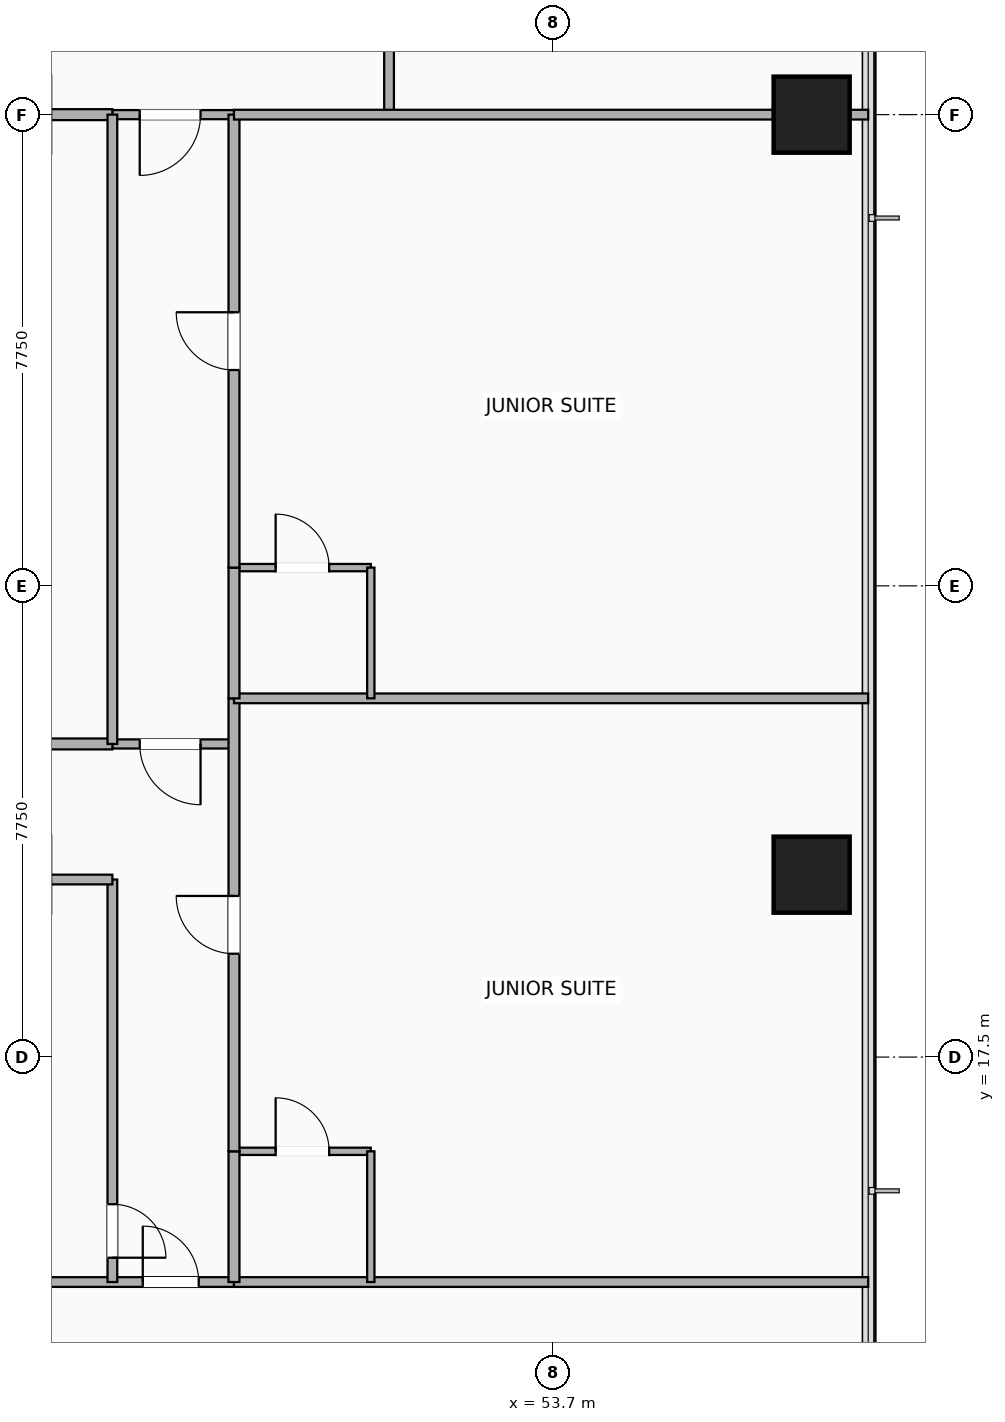
"""IFC4 building model, lengths in metres.
Left out: names, types, materials, properties, quantities, classifications, styles, units other than length and angle.
Written with IfcOpenShell. Run it as: python <this file> out.ifc"""

import sys

from ifc_helpers import new_model, si_unit, direction, frame, frame_2d, origin, origin_2d, place, context, subcontext, project, spatial, rectangle, extrude, element, fill, save


model = new_model("IFC4")
c1 = context("Model", 3, precision=1e-05, world=origin(), true_north=direction((0.0, 1.0)))
c2 = subcontext(c1, "Body", "Model", "MODEL_VIEW")
j1 = project(units=[si_unit("LENGTHUNIT", "METRE"), si_unit("PLANEANGLEUNIT", "RADIAN")], contexts=[c1])
p1 = place(None, origin())
s1 = spatial("IfcSite", under=j1, at=p1, CompositionType="ELEMENT")
p2 = place(p1, origin())
s2 = spatial("IfcBuilding", under=s1, at=p2, CompositionType="ELEMENT")
p3 = place(p2, frame((0.0, 0.0, 91.7)))
s3 = spatial("IfcBuildingStorey", under=s2, at=p3, CompositionType="ELEMENT", Elevation=91.7)
for number, where, z_axis, x_axis in (
    (1, (57.95, 20.5, -0.26), (0.0, 0.0, 1.0), (1.0, 0.0, 0.0)),
    (2, (57.95, 33.0, -0.26), (0.0, 0.0, 1.0), (1.0, 0.0, 0.0)),
):
    element("IfcColumn", number, at=place(p3, frame(where, z_axis=z_axis, x_axis=x_axis)), inside=s3, PredefinedType="COLUMN", context=c2, shape_type="SweptSolid", body=[
        extrude(rectangle(XDim=1.25, YDim=1.25, at=origin_2d()), origin(), (0.0, 0.0, 1.0), 3.5),
    ])
p4 = place(p3, frame((44.8, 13.8, 0.0), z_axis=(0.0, 0.0, 1.0), x_axis=(1.0, 0.0, 0.0)))
e3 = element("IfcWall", 3, at=p4, inside=s3, PredefinedType="PARTITIONING", context=c2, shape_type="SweptSolid", body=[
    extrude(rectangle(XDim=3.65, YDim=0.16, at=frame_2d((1.825, 0.0))), origin(), (0.0, 0.0, 1.0), 2.313),
])
p5 = place(p4, frame((3.07, 0.0, 0.0), z_axis=(0.0, 0.0, 1.0), x_axis=(-1.0, 0.0, 0.0)))
e4 = element("IfcOpeningElement", 4, at=p5, cuts=e3, PredefinedType="OPENING", context=c2, shape_type="SweptSolid", body=[
    extrude(rectangle(XDim=0.92, YDim=2.08, at=frame_2d((0.46, 1.04))), frame((0.0, 0.09, 0.0), z_axis=(0.0, -1.0, 0.0), x_axis=(1.0, 0.0, 0.0)), (0.0, 0.0, 1.0), 0.18),
])
p6 = place(p3, frame((46.45, 13.8, 0.0), z_axis=(0.0, 0.0, 1.0), x_axis=(0.0, 1.0, 0.0)))
e5 = element("IfcWall", 5, at=p6, inside=s3, PredefinedType="PARTITIONING", context=c2, shape_type="SweptSolid", body=[
    extrude(rectangle(XDim=6.62, YDim=0.16, at=frame_2d((3.31, 0.0))), origin(), (0.0, 0.0, 1.0), 2.313),
])
p7 = place(p6, frame((0.4, 0.0, 0.0)))
e6 = element("IfcOpeningElement", 6, at=p7, cuts=e5, PredefinedType="OPENING", context=c2, shape_type="SweptSolid", body=[
    extrude(rectangle(XDim=0.88, YDim=2.08, at=frame_2d((0.44, 1.04))), frame((0.0, 0.09, 0.0), z_axis=(0.0, -1.0, 0.0), x_axis=(1.0, 0.0, 0.0)), (0.0, 0.0, 1.0), 0.18),
])
p8 = place(p3, frame((44.8, 20.42, 0.0), z_axis=(0.0, 0.0, 1.0), x_axis=(1.0, 0.0, 0.0)))
e7 = element("IfcWall", 7, at=p8, inside=s3, PredefinedType="PARTITIONING", context=c2, shape_type="SweptSolid", body=[
    extrude(rectangle(XDim=1.65, YDim=0.16, at=frame_2d((0.825, 0.0))), origin(), (0.0, 0.0, 1.0), 2.313),
])
p9 = place(p3, frame((46.45, 22.65, 0.0), z_axis=(0.0, 0.0, 1.0), x_axis=(1.0, 0.0, 0.0)))
e8 = element("IfcWall", 8, at=p9, inside=s3, PredefinedType="PARTITIONING", context=c2, shape_type="SweptSolid", body=[
    extrude(rectangle(XDim=2.0, YDim=0.15, at=frame_2d((1.0, 0.0))), origin(), (0.0, 0.0, 1.0), 3.24),
])
p10 = place(p9, frame((0.45, 0.0, 0.0)))
e9 = element("IfcOpeningElement", 9, at=p10, cuts=e8, PredefinedType="OPENING", context=c2, shape_type="SweptSolid", body=[
    extrude(rectangle(XDim=1.0, YDim=2.15, at=frame_2d((0.5, 1.075))), frame((0.0, 0.085, 0.0), z_axis=(0.0, -1.0, 0.0), x_axis=(1.0, 0.0, 0.0)), (0.0, 0.0, 1.0), 0.17),
])
p11 = place(p3, frame((46.45, 33.0, 0.0), z_axis=(0.0, 0.0, 1.0), x_axis=(1.0, 0.0, 0.0)))
e10 = element("IfcWall", 10, at=p11, inside=s3, PredefinedType="PARTITIONING", context=c2, shape_type="SweptSolid", body=[
    extrude(rectangle(XDim=2.0, YDim=0.15, at=frame_2d((1.0, 0.0))), origin(), (0.0, 0.0, 1.0), 2.313),
])
p12 = place(p11, frame((0.45, 0.0, 0.0)))
e11 = element("IfcOpeningElement", 11, at=p12, cuts=e10, PredefinedType="OPENING", context=c2, shape_type="SweptSolid", body=[
    extrude(rectangle(XDim=1.0, YDim=2.15, at=frame_2d((0.5, 1.075))), frame((0.0, 0.085, 0.0), z_axis=(0.0, -1.0, 0.0), x_axis=(1.0, 0.0, 0.0)), (0.0, 0.0, 1.0), 0.17),
])
p13 = place(p3, frame((51.0, 33.0, 0.0), z_axis=(0.0, 0.0, 1.0), x_axis=(0.0, 1.0, 0.0)))
e12 = element("IfcWall", 12, at=p13, inside=s3, PredefinedType="PARTITIONING", context=c2, shape_type="SweptSolid", body=[
    extrude(rectangle(XDim=2.05, YDim=0.16, at=frame_2d((1.025, 0.0))), origin(), (0.0, 0.0, 1.0), 2.313),
])
p14 = place(p3, frame((40.9, 22.65, 0.0), z_axis=(0.0, 0.0, 1.0), x_axis=(1.0, 0.0, 0.0)))
e13 = element("IfcWall", 13, at=p14, inside=s3, PredefinedType="PARTITIONING", context=c2, shape_type="SweptSolid", body=[
    extrude(rectangle(XDim=5.55, YDim=0.18, at=frame_2d((2.775, 0.0))), origin(), (0.0, 0.0, 1.0), 2.313),
])
p15 = place(p14, frame((2.3, 0.0, 0.0)))
e14 = element("IfcOpeningElement", 14, at=p15, cuts=e13, PredefinedType="OPENING", context=c2, shape_type="SweptSolid", body=[
    extrude(rectangle(XDim=0.95, YDim=2.15, at=frame_2d((0.475, 1.075))), frame((0.0, 0.1, 0.0), z_axis=(0.0, -1.0, 0.0), x_axis=(1.0, 0.0, 0.0)), (0.0, 0.0, 1.0), 0.2),
])
p16 = place(p3, frame((40.9, 33.0, 0.0), z_axis=(0.0, 0.0, 1.0), x_axis=(1.0, 0.0, 0.0)))
e15 = element("IfcWall", 15, at=p16, inside=s3, PredefinedType="PARTITIONING", context=c2, shape_type="SweptSolid", body=[
    extrude(rectangle(XDim=5.55, YDim=0.18, at=frame_2d((2.775, 0.0))), origin(), (0.0, 0.0, 1.0), 2.313),
])
p17 = place(p3, frame((46.45, 22.65, 0.0), z_axis=(0.0, 0.0, 1.0), x_axis=(0.0, 1.0, 0.0)))
e16 = element("IfcWall", 16, at=p17, inside=s3, PredefinedType="PARTITIONING", context=c2, shape_type="SweptSolid", body=[
    extrude(rectangle(XDim=10.35, YDim=0.16, at=frame_2d((5.175, 0.0))), origin(), (0.0, 0.0, 1.0), 2.313),
])
p18 = place(p3, frame((48.45, 13.8, 0.0), z_axis=(0.0, 0.0, 1.0), x_axis=(1.0, 0.0, 0.0)))
e17 = element("IfcWall", 17, at=p18, inside=s3, PredefinedType="PARTITIONING", context=c2, shape_type="SweptSolid", body=[
    extrude(rectangle(XDim=10.43, YDim=0.16, at=frame_2d((5.215, 0.0))), origin(), (0.0, 0.0, 1.0), 2.603),
])
p19 = place(p3, frame((48.45, 15.95, 0.0), z_axis=(0.0, 0.0, 1.0), x_axis=(1.0, 0.0, 0.0)))
e18 = element("IfcWall", 18, at=p19, inside=s3, PredefinedType="PARTITIONING", context=c2, shape_type="SweptSolid", body=[
    extrude(rectangle(XDim=2.25, YDim=0.12, at=frame_2d((1.125, 0.0))), origin(), (0.0, 0.0, 1.0), 3.24),
])
p20 = place(p19, frame((1.565, 0.0, 0.0), z_axis=(0.0, 0.0, 1.0), x_axis=(-1.0, 0.0, 0.0)))
e19 = element("IfcOpeningElement", 19, at=p20, cuts=e18, PredefinedType="OPENING", context=c2, shape_type="SweptSolid", body=[
    extrude(rectangle(XDim=0.88, YDim=2.08, at=frame_2d((0.44, 1.04))), frame((0.0, 0.07, 0.0), z_axis=(0.0, -1.0, 0.0), x_axis=(1.0, 0.0, 0.0)), (0.0, 0.0, 1.0), 0.14),
])
p21 = place(p3, frame((50.7, 13.8, 0.0), z_axis=(0.0, 0.0, 1.0), x_axis=(0.0, 1.0, 0.0)))
e20 = element("IfcWall", 20, at=p21, inside=s3, PredefinedType="PARTITIONING", context=c2, shape_type="SweptSolid", body=[
    extrude(rectangle(XDim=2.15, YDim=0.12, at=frame_2d((1.075, 0.0))), origin(), (0.0, 0.0, 1.0), 2.922),
])
p22 = place(p3, frame((48.45, 13.8, 0.0), z_axis=(0.0, 0.0, 1.0), x_axis=(0.0, 1.0, 0.0)))
e21 = element("IfcWall", 21, at=p22, inside=s3, PredefinedType="PARTITIONING", context=c2, shape_type="SweptSolid", body=[
    extrude(rectangle(XDim=2.15, YDim=0.18, at=frame_2d((1.075, 0.0))), origin(), (0.0, 0.0, 1.0), 2.922),
])
p23 = place(p3, frame((48.45, 15.95, 0.0), z_axis=(0.0, 0.0, 1.0), x_axis=(0.0, 1.0, 0.0)))
e22 = element("IfcWall", 22, at=p23, inside=s3, PredefinedType="PARTITIONING", context=c2, shape_type="SweptSolid", body=[
    extrude(rectangle(XDim=7.45, YDim=0.18, at=frame_2d((3.725, 0.0))), origin(), (0.0, 0.0, 1.0), 2.313),
])
p24 = place(p23, frame((4.2, 0.0, 0.0), z_axis=(0.0, 0.0, 1.0), x_axis=(-1.0, 0.0, 0.0)))
e23 = element("IfcOpeningElement", 23, at=p24, cuts=e22, PredefinedType="OPENING", context=c2, shape_type="SweptSolid", body=[
    extrude(rectangle(XDim=0.95, YDim=2.15, at=frame_2d((0.475, 1.075))), frame((0.0, 0.1, 0.0), z_axis=(0.0, -1.0, 0.0), x_axis=(1.0, 0.0, 0.0)), (0.0, 0.0, 1.0), 0.2),
])
p25 = place(p3, frame((48.45, 23.4, 0.0), z_axis=(0.0, 0.0, 1.0), x_axis=(1.0, 0.0, 0.0)))
e24 = element("IfcWall", 24, at=p25, inside=s3, PredefinedType="PARTITIONING", context=c2, shape_type="SweptSolid", body=[
    extrude(rectangle(XDim=10.43, YDim=0.16, at=frame_2d((5.215, 0.0))), origin(), (0.0, 0.0, 1.0), 2.603),
])
p26 = place(p3, frame((48.45, 25.55, 0.0), z_axis=(0.0, 0.0, 1.0), x_axis=(1.0, 0.0, 0.0)))
e25 = element("IfcWall", 25, at=p26, inside=s3, PredefinedType="PARTITIONING", context=c2, shape_type="SweptSolid", body=[
    extrude(rectangle(XDim=2.25, YDim=0.12, at=frame_2d((1.125, 0.0))), origin(), (0.0, 0.0, 1.0), 3.24),
])
p27 = place(p26, frame((1.565, 0.0, 0.0), z_axis=(0.0, 0.0, 1.0), x_axis=(-1.0, 0.0, 0.0)))
e26 = element("IfcOpeningElement", 26, at=p27, cuts=e25, PredefinedType="OPENING", context=c2, shape_type="SweptSolid", body=[
    extrude(rectangle(XDim=0.88, YDim=2.08, at=frame_2d((0.44, 1.04))), frame((0.0, 0.07, 0.0), z_axis=(0.0, -1.0, 0.0), x_axis=(1.0, 0.0, 0.0)), (0.0, 0.0, 1.0), 0.14),
])
p28 = place(p3, frame((50.7, 23.4, 0.0), z_axis=(0.0, 0.0, 1.0), x_axis=(0.0, 1.0, 0.0)))
e27 = element("IfcWall", 27, at=p28, inside=s3, PredefinedType="PARTITIONING", context=c2, shape_type="SweptSolid", body=[
    extrude(rectangle(XDim=2.15, YDim=0.12, at=frame_2d((1.075, 0.0))), origin(), (0.0, 0.0, 1.0), 2.818),
])
p29 = place(p3, frame((48.45, 23.4, 0.0), z_axis=(0.0, 0.0, 1.0), x_axis=(0.0, 1.0, 0.0)))
e28 = element("IfcWall", 28, at=p29, inside=s3, PredefinedType="PARTITIONING", context=c2, shape_type="SweptSolid", body=[
    extrude(rectangle(XDim=2.15, YDim=0.18, at=frame_2d((1.075, 0.0))), origin(), (0.0, 0.0, 1.0), 2.818),
])
p30 = place(p3, frame((48.45, 25.55, 0.0), z_axis=(0.0, 0.0, 1.0), x_axis=(0.0, 1.0, 0.0)))
e29 = element("IfcWall", 29, at=p30, inside=s3, PredefinedType="PARTITIONING", context=c2, shape_type="SweptSolid", body=[
    extrude(rectangle(XDim=7.45, YDim=0.18, at=frame_2d((3.725, 0.0))), origin(), (0.0, 0.0, 1.0), 2.313),
])
p31 = place(p30, frame((4.2, 0.0, 0.0), z_axis=(0.0, 0.0, 1.0), x_axis=(-1.0, 0.0, 0.0)))
e30 = element("IfcOpeningElement", 30, at=p31, cuts=e29, PredefinedType="OPENING", context=c2, shape_type="SweptSolid", body=[
    extrude(rectangle(XDim=0.95, YDim=2.15, at=frame_2d((0.475, 1.075))), frame((0.0, 0.1, 0.0), z_axis=(0.0, -1.0, 0.0), x_axis=(1.0, 0.0, 0.0)), (0.0, 0.0, 1.0), 0.2),
])
p32 = place(p3, frame((48.45, 33.0, 0.0), z_axis=(0.0, 0.0, 1.0), x_axis=(1.0, 0.0, 0.0)))
e31 = element("IfcWall", 31, at=p32, inside=s3, PredefinedType="PARTITIONING", context=c2, shape_type="SweptSolid", body=[
    extrude(rectangle(XDim=10.43, YDim=0.16, at=frame_2d((5.215, 0.0))), origin(), (0.0, 0.0, 1.0), 2.313),
])
p33 = place(p5, origin())
e32 = element("IfcDoor", 32, at=p33, inside=s3, OperationType="SINGLE_SWING_LEFT", PredefinedType="DOOR", context=c2, shape_type="SweptSolid", body=[
    extrude(rectangle(XDim=0.92, YDim=2.08, at=frame_2d((0.46, 1.04))), frame((0.0, 0.025, 0.0), z_axis=(0.0, -1.0, 0.0), x_axis=(1.0, 0.0, 0.0)), (0.0, 0.0, 1.0), 0.05),
])
fill(e4, e32)
p34 = place(p7, origin())
e33 = element("IfcDoor", 33, at=p34, inside=s3, OperationType="SINGLE_SWING_LEFT", PredefinedType="DOOR", context=c2, shape_type="SweptSolid", body=[
    extrude(rectangle(XDim=0.88, YDim=2.08, at=frame_2d((0.44, 1.04))), frame((0.0, 0.025, 0.0), z_axis=(0.0, -1.0, 0.0), x_axis=(1.0, 0.0, 0.0)), (0.0, 0.0, 1.0), 0.05),
])
fill(e6, e33)
p35 = place(p10, origin())
e34 = element("IfcDoor", 34, at=p35, inside=s3, OperationType="SINGLE_SWING_RIGHT", PredefinedType="DOOR", context=c2, shape_type="SweptSolid", body=[
    extrude(rectangle(XDim=1.0, YDim=2.15, at=frame_2d((0.5, 1.075))), frame((0.0, 0.025, 0.0), z_axis=(0.0, -1.0, 0.0), x_axis=(1.0, 0.0, 0.0)), (0.0, 0.0, 1.0), 0.05),
])
fill(e9, e34)
p36 = place(p12, origin())
e35 = element("IfcDoor", 35, at=p36, inside=s3, OperationType="SINGLE_SWING_LEFT", PredefinedType="DOOR", context=c2, shape_type="SweptSolid", body=[
    extrude(rectangle(XDim=1.0, YDim=2.15, at=frame_2d((0.5, 1.075))), frame((0.0, 0.025, 0.0), z_axis=(0.0, -1.0, 0.0), x_axis=(1.0, 0.0, 0.0)), (0.0, 0.0, 1.0), 0.05),
])
fill(e11, e35)
p37 = place(p20, origin())
e36 = element("IfcDoor", 36, at=p37, inside=s3, OperationType="SINGLE_SWING_LEFT", PredefinedType="DOOR", context=c2, shape_type="SweptSolid", body=[
    extrude(rectangle(XDim=0.88, YDim=2.08, at=frame_2d((0.44, 1.04))), frame((0.0, 0.025, 0.0), z_axis=(0.0, -1.0, 0.0), x_axis=(1.0, 0.0, 0.0)), (0.0, 0.0, 1.0), 0.05),
])
fill(e19, e36)
p38 = place(p24, origin())
e37 = element("IfcDoor", 37, at=p38, inside=s3, OperationType="SINGLE_SWING_RIGHT", PredefinedType="DOOR", context=c2, shape_type="SweptSolid", body=[
    extrude(rectangle(XDim=0.95, YDim=2.15, at=frame_2d((0.475, 1.075))), frame((0.0, 0.025, 0.0), z_axis=(0.0, -1.0, 0.0), x_axis=(1.0, 0.0, 0.0)), (0.0, 0.0, 1.0), 0.05),
])
fill(e23, e37)
p39 = place(p27, origin())
e38 = element("IfcDoor", 38, at=p39, inside=s3, OperationType="SINGLE_SWING_LEFT", PredefinedType="DOOR", context=c2, shape_type="SweptSolid", body=[
    extrude(rectangle(XDim=0.88, YDim=2.08, at=frame_2d((0.44, 1.04))), frame((0.0, 0.025, 0.0), z_axis=(0.0, -1.0, 0.0), x_axis=(1.0, 0.0, 0.0)), (0.0, 0.0, 1.0), 0.05),
])
fill(e26, e38)
p40 = place(p31, origin())
e39 = element("IfcDoor", 39, at=p40, inside=s3, OperationType="SINGLE_SWING_RIGHT", PredefinedType="DOOR", context=c2, shape_type="SweptSolid", body=[
    extrude(rectangle(XDim=0.95, YDim=2.15, at=frame_2d((0.475, 1.075))), frame((0.0, 0.025, 0.0), z_axis=(0.0, -1.0, 0.0), x_axis=(1.0, 0.0, 0.0)), (0.0, 0.0, 1.0), 0.05),
])
fill(e30, e39)
save(model, sys.argv[1])
